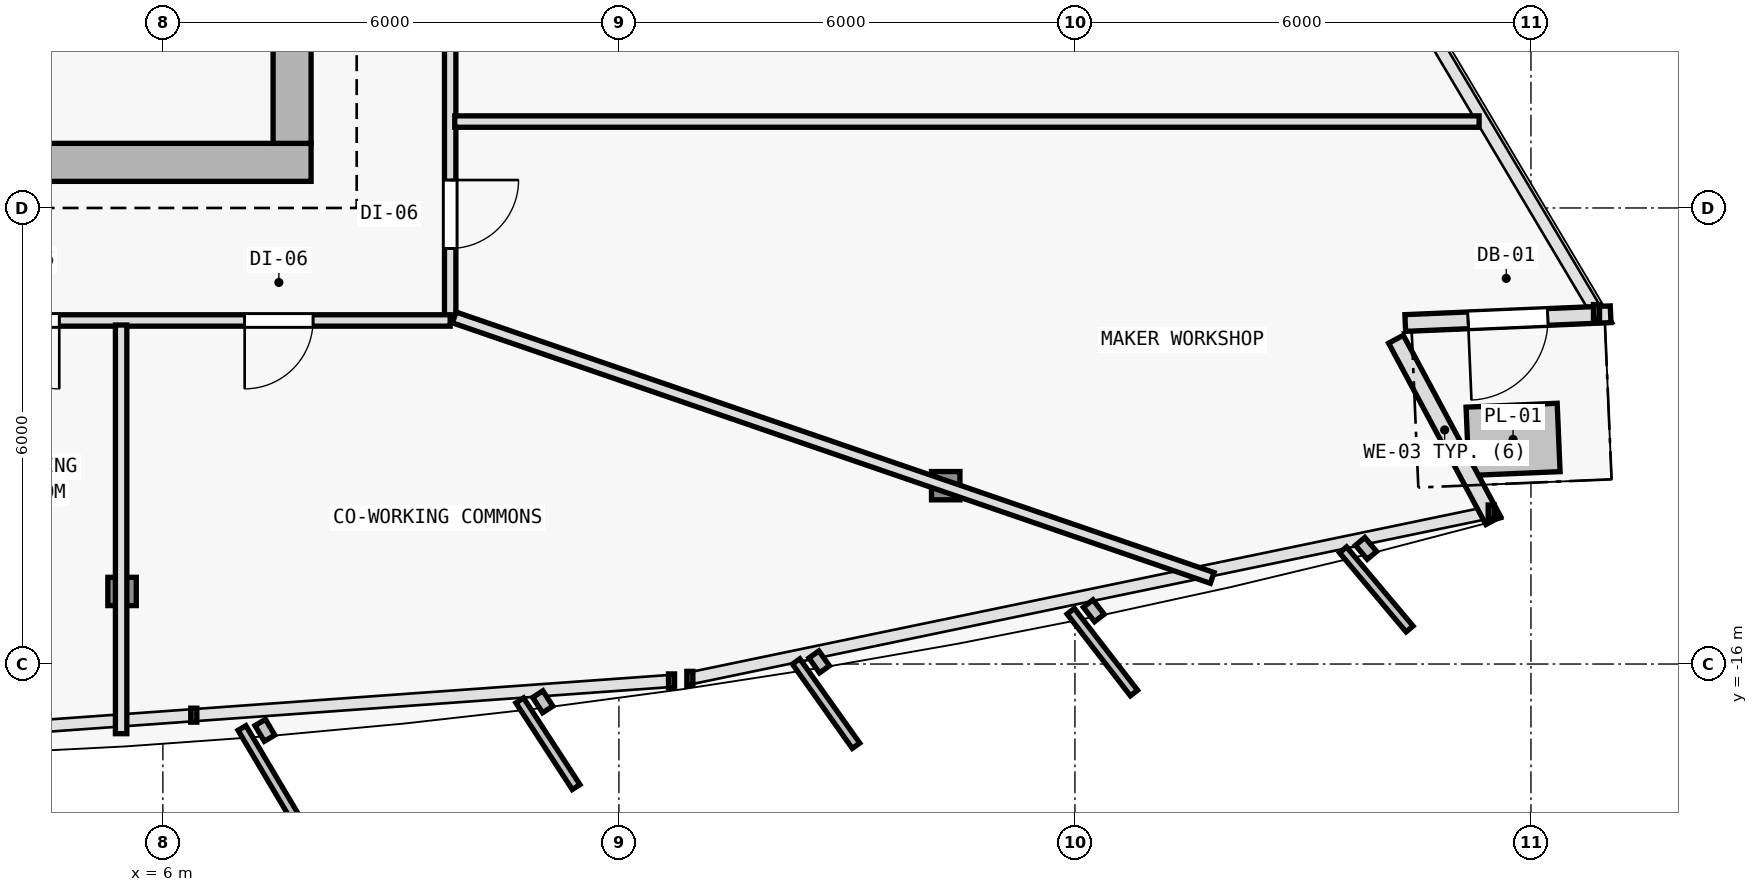
"""IFC4 building model, lengths in metres.
Left out: names, types, materials, properties, quantities, classifications, styles, units other than length and angle.
Written with IfcOpenShell. Run it as: python <this file> out.ifc"""

import sys

from ifc_helpers import new_model, si_unit, direction, frame, frame_2d, origin, origin_2d, place, context, subcontext, project, spatial, rectangle, i_section, extrude, element, fill, save


model = new_model("IFC4")
c1 = context("Model", 3, precision=1e-05, world=origin(), true_north=direction((0.0, 1.0)))
c2 = subcontext(c1, "Body", "Model", "MODEL_VIEW")
j1 = project(units=[si_unit("LENGTHUNIT", "METRE"), si_unit("PLANEANGLEUNIT", "RADIAN")], contexts=[c1])
p1 = place(None, origin())
s1 = spatial("IfcSite", under=j1, at=p1, CompositionType="ELEMENT")
p2 = place(p1, origin())
s2 = spatial("IfcBuilding", under=s1, at=p2, CompositionType="ELEMENT")
p3 = place(p2, frame((0.0, 0.0, 230.7)))
s3 = spatial("IfcBuildingStorey", under=s2, at=p3, CompositionType="ELEMENT", Elevation=230.7)
p4 = place(p3, frame((7.7, -9.4, 0.0), z_axis=(0.0, 0.0, 1.0), x_axis=(1.0, 0.0, 0.0)))
e1 = element("IfcColumn", 1, at=p4, inside=s3, PredefinedType="COLUMN", context=c2, shape_type="SweptSolid", body=[
    extrude(i_section(OverallWidth=0.398, OverallDepth=0.387, WebThickness=0.013, FlangeThickness=0.022, FilletRadius=0.015, at=origin_2d()), origin(), (0.0, 0.0, 1.0), 3.6),
])
p5 = place(p3, frame((5.463, -15.045, 0.006), z_axis=(-0.006934288159, 0.035283289748, 0.999353293441), x_axis=(-0.981229659911, -0.192842823335, 0.0)))
e2 = element("IfcColumn", 2, at=p5, inside=s3, PredefinedType="COLUMN", context=c2, shape_type="SweptSolid", body=[
    extrude(i_section(OverallWidth=0.374, OverallDepth=0.372, WebThickness=0.012, FlangeThickness=0.02, FilletRadius=0.015, at=origin_2d()), origin(), (0.0, 0.0, 1.0), 3.591),
])
p6 = place(p3, frame((16.3, -13.654, 0.006), z_axis=(-0.020596292833, 0.033511459955, 0.999226087917), x_axis=(-0.851954850327, -0.523615252838, 0.0)))
e3 = element("IfcColumn", 3, at=p6, inside=s3, PredefinedType="COLUMN", context=c2, shape_type="SweptSolid", body=[
    extrude(i_section(OverallWidth=0.374, OverallDepth=0.372, WebThickness=0.012, FlangeThickness=0.02, FilletRadius=0.015, at=origin_2d()), origin(), (0.0, 0.0, 1.0), 3.592),
])
p7 = place(p3, frame((22.224, -11.727, 0.0), z_axis=(0.0, 0.0, 1.0), x_axis=(0.47278184311, -0.881179509989, 0.0)))
e4 = element("IfcWall", 4, at=p7, inside=s3, PredefinedType="SOLIDWALL", context=c2, shape_type="SweptSolid", body=[
    extrude(rectangle(XDim=2.708, YDim=0.22, at=frame_2d((1.354, 0.0))), origin(), (0.0, 0.0, 1.0), 3.35),
])
p8 = place(p3, frame((25.048, -11.398, 0.0), z_axis=(0.0, 0.0, 1.0), x_axis=(-0.999095922254, -0.042512799655, 0.0)))
e5 = element("IfcWall", 5, at=p8, inside=s3, PredefinedType="SOLIDWALL", context=c2, shape_type="SweptSolid", body=[
    extrude(rectangle(XDim=2.705, YDim=0.22, at=frame_2d((1.353, 0.0))), origin(), (0.0, 0.0, 1.0), 3.35),
])
p9 = place(p8, frame((0.827, 0.0, 0.0)))
e6 = element("IfcOpeningElement", 6, at=p9, cuts=e5, PredefinedType="OPENING", context=c2, shape_type="SweptSolid", body=[
    extrude(rectangle(XDim=1.05, YDim=2.15, at=frame_2d((0.525, 1.075))), frame((0.0, 0.12, 0.0), z_axis=(0.0, -1.0, 0.0), x_axis=(1.0, 0.0, 0.0)), (0.0, 0.0, 1.0), 0.24),
])
p10 = place(p3, frame((-7.95, -9.4, 0.0), z_axis=(0.0, 0.0, 1.0), x_axis=(1.0, 0.0, 0.0)))
e7 = element("IfcWall", 7, at=p10, inside=s3, PredefinedType="SHEAR", context=c2, shape_type="SweptSolid", body=[
    extrude(rectangle(XDim=15.9, YDim=0.5, at=frame_2d((7.95, 0.0))), origin(), (0.0, 0.0, 1.0), 3.35),
])
p11 = place(p10, frame((9.6, 0.0, 0.0)))
e8 = element("IfcOpeningElement", 8, at=p11, cuts=e7, PredefinedType="OPENING", context=c2, shape_type="SweptSolid", body=[
    extrude(rectangle(XDim=1.5, YDim=2.2, at=frame_2d((0.75, 1.1))), frame((0.0, 0.26, 0.0), z_axis=(0.0, -1.0, 0.0), x_axis=(1.0, 0.0, 0.0)), (0.0, 0.0, 1.0), 0.52),
])
p12 = place(p3, frame((7.7, 9.95, 0.0), z_axis=(0.0, 0.0, 1.0), x_axis=(0.0, -1.0, 0.0)))
e9 = element("IfcWall", 9, at=p12, inside=s3, PredefinedType="SHEAR", context=c2, shape_type="SweptSolid", body=[
    extrude(rectangle(XDim=19.1, YDim=0.5, at=frame_2d((9.55, 0.0))), origin(), (0.0, 0.0, 1.0), 3.35),
])
p13 = place(p3, frame((9.78, 8.226, 0.0), z_axis=(0.0, 0.0, 1.0), x_axis=(0.0, -1.0, 0.0)))
e10 = element("IfcWall", 10, at=p13, inside=s3, PredefinedType="PARTITIONING", context=c2, shape_type="SweptSolid", body=[
    extrude(rectangle(XDim=19.706, YDim=0.15, at=frame_2d((9.853, 0.0))), origin(), (0.0, 0.0, 1.0), 2.875),
])
p14 = place(p13, frame((17.858, 0.0, 0.0)))
e11 = element("IfcOpeningElement", 11, at=p14, cuts=e10, PredefinedType="OPENING", context=c2, shape_type="SweptSolid", body=[
    extrude(rectangle(XDim=0.9, YDim=2.1, at=frame_2d((0.45, 1.05))), frame((0.0, 0.085, 0.0), z_axis=(0.0, -1.0, 0.0), x_axis=(1.0, 0.0, 0.0)), (0.0, 0.0, 1.0), 0.17),
])
p15 = place(p13, frame((14.97, 0.0, 0.0)))
e12 = element("IfcOpeningElement", 12, at=p15, cuts=e10, PredefinedType="OPENING", context=c2, shape_type="SweptSolid", body=[
    extrude(rectangle(XDim=0.9, YDim=2.1, at=frame_2d((0.45, 1.05))), frame((0.0, 0.085, 0.0), z_axis=(0.0, -1.0, 0.0), x_axis=(1.0, 0.0, 0.0)), (0.0, 0.0, 1.0), 0.17),
])
p16 = place(p13, frame((12.141, 0.0, 0.0)))
e13 = element("IfcOpeningElement", 13, at=p16, cuts=e10, PredefinedType="OPENING", context=c2, shape_type="SweptSolid", body=[
    extrude(rectangle(XDim=0.9, YDim=2.1, at=frame_2d((0.45, 1.05))), frame((0.0, 0.085, 0.0), z_axis=(0.0, -1.0, 0.0), x_axis=(1.0, 0.0, 0.0)), (0.0, 0.0, 1.0), 0.17),
])
p17 = place(p13, frame((9.909, 0.0, 0.0)))
e14 = element("IfcOpeningElement", 14, at=p17, cuts=e10, PredefinedType="OPENING", context=c2, shape_type="SweptSolid", body=[
    extrude(rectangle(XDim=0.9, YDim=2.1, at=frame_2d((0.45, 1.05))), frame((0.0, 0.085, 0.0), z_axis=(0.0, -1.0, 0.0), x_axis=(1.0, 0.0, 0.0)), (0.0, 0.0, 1.0), 0.17),
])
p18 = place(p13, frame((7.721, 0.0, 0.0)))
e15 = element("IfcOpeningElement", 15, at=p18, cuts=e10, PredefinedType="OPENING", context=c2, shape_type="SweptSolid", body=[
    extrude(rectangle(XDim=0.9, YDim=2.1, at=frame_2d((0.45, 1.05))), frame((0.0, 0.085, 0.0), z_axis=(0.0, -1.0, 0.0), x_axis=(1.0, 0.0, 0.0)), (0.0, 0.0, 1.0), 0.17),
])
p19 = place(p13, frame((5.136, 0.0, 0.0)))
e16 = element("IfcOpeningElement", 16, at=p19, cuts=e10, PredefinedType="OPENING", context=c2, shape_type="SweptSolid", body=[
    extrude(rectangle(XDim=0.9, YDim=2.1, at=frame_2d((0.45, 1.05))), frame((0.0, 0.085, 0.0), z_axis=(0.0, -1.0, 0.0), x_axis=(1.0, 0.0, 0.0)), (0.0, 0.0, 1.0), 0.17),
])
p20 = place(p13, frame((2.577, 0.0, 0.0)))
e17 = element("IfcOpeningElement", 17, at=p20, cuts=e10, PredefinedType="OPENING", context=c2, shape_type="SweptSolid", body=[
    extrude(rectangle(XDim=0.9, YDim=2.1, at=frame_2d((0.45, 1.05))), frame((0.0, 0.085, 0.0), z_axis=(0.0, -1.0, 0.0), x_axis=(1.0, 0.0, 0.0)), (0.0, 0.0, 1.0), 0.17),
])
p21 = place(p3, frame((9.78, -11.48, 0.0), z_axis=(0.0, 0.0, 1.0), x_axis=(-1.0, 0.0, 0.0)))
e18 = element("IfcWall", 18, at=p21, inside=s3, PredefinedType="PARTITIONING", context=c2, shape_type="SweptSolid", body=[
    extrude(rectangle(XDim=19.56, YDim=0.15, at=frame_2d((9.78, 0.0))), origin(), (0.0, 0.0, 1.0), 3.005),
])
p22 = place(p21, frame((13.737, 0.0, 0.0)))
e19 = element("IfcOpeningElement", 19, at=p22, cuts=e18, PredefinedType="OPENING", context=c2, shape_type="SweptSolid", body=[
    extrude(rectangle(XDim=0.9, YDim=2.1, at=frame_2d((0.45, 1.05))), frame((0.0, 0.085, 0.0), z_axis=(0.0, -1.0, 0.0), x_axis=(1.0, 0.0, 0.0)), (0.0, 0.0, 1.0), 0.17),
])
p23 = place(p21, frame((11.786, 0.0, 0.0)))
e20 = element("IfcOpeningElement", 20, at=p23, cuts=e18, PredefinedType="OPENING", context=c2, shape_type="SweptSolid", body=[
    extrude(rectangle(XDim=0.85, YDim=2.1, at=frame_2d((0.425, 1.05))), frame((0.0, 0.085, 0.0), z_axis=(0.0, -1.0, 0.0), x_axis=(1.0, 0.0, 0.0)), (0.0, 0.0, 1.0), 0.17),
])
p24 = place(p21, frame((9.711, 0.0, 0.0)))
e21 = element("IfcOpeningElement", 21, at=p24, cuts=e18, PredefinedType="OPENING", context=c2, shape_type="SweptSolid", body=[
    extrude(rectangle(XDim=0.9, YDim=2.1, at=frame_2d((0.45, 1.05))), frame((0.0, 0.085, 0.0), z_axis=(0.0, -1.0, 0.0), x_axis=(1.0, 0.0, 0.0)), (0.0, 0.0, 1.0), 0.17),
])
p25 = place(p21, frame((7.476, 0.0, 0.0)))
e22 = element("IfcOpeningElement", 22, at=p25, cuts=e18, PredefinedType="OPENING", context=c2, shape_type="SweptSolid", body=[
    extrude(rectangle(XDim=0.9, YDim=2.1, at=frame_2d((0.45, 1.05))), frame((0.0, 0.085, 0.0), z_axis=(0.0, -1.0, 0.0), x_axis=(1.0, 0.0, 0.0)), (0.0, 0.0, 1.0), 0.17),
])
p26 = place(p21, frame((5.143, 0.0, 0.0)))
e23 = element("IfcOpeningElement", 23, at=p26, cuts=e18, PredefinedType="OPENING", context=c2, shape_type="SweptSolid", body=[
    extrude(rectangle(XDim=0.9, YDim=2.1, at=frame_2d((0.45, 1.05))), frame((0.0, 0.085, 0.0), z_axis=(0.0, -1.0, 0.0), x_axis=(1.0, 0.0, 0.0)), (0.0, 0.0, 1.0), 0.17),
])
p27 = place(p21, frame((1.804, 0.0, 0.0)))
e24 = element("IfcOpeningElement", 24, at=p27, cuts=e18, PredefinedType="OPENING", context=c2, shape_type="SweptSolid", body=[
    extrude(rectangle(XDim=0.9, YDim=2.1, at=frame_2d((0.45, 1.05))), frame((0.0, 0.085, 0.0), z_axis=(0.0, -1.0, 0.0), x_axis=(1.0, 0.0, 0.0)), (0.0, 0.0, 1.0), 0.17),
])
p28 = place(p3, frame((5.45, -11.54, 0.0), z_axis=(0.0, 0.0, 1.0), x_axis=(0.0, -1.0, 0.0)))
e25 = element("IfcWall", 25, at=p28, inside=s3, PredefinedType="PARTITIONING", context=c2, shape_type="SweptSolid", body=[
    extrude(rectangle(XDim=5.376, YDim=0.15, at=frame_2d((2.688, 0.0))), origin(), (0.0, 0.0, 1.0), 2.775),
])
p29 = place(p3, frame((9.84, -8.863, 0.0), z_axis=(0.0, 0.0, 1.0), x_axis=(1.0, 0.0, 0.0)))
e26 = element("IfcWall", 26, at=p29, inside=s3, PredefinedType="PARTITIONING", context=c2, shape_type="SweptSolid", body=[
    extrude(rectangle(XDim=13.478, YDim=0.15, at=frame_2d((6.739, 0.0))), origin(), (0.0, 0.0, 1.0), 2.875),
])
p30 = place(p3, frame((9.834, -11.44, 0.0), z_axis=(0.0, 0.0, 1.0), x_axis=(0.945727964629, -0.324959408108, 0.0)))
e27 = element("IfcWall", 27, at=p30, inside=s3, PredefinedType="PARTITIONING", context=c2, shape_type="SweptSolid", body=[
    extrude(rectangle(XDim=10.544, YDim=0.15, at=frame_2d((5.272, 0.0))), origin(), (0.0, 0.0, 1.0), 2.825),
])
p31 = place(p9, origin())
e28 = element("IfcDoor", 28, at=p31, inside=s3, OperationType="SINGLE_SWING_RIGHT", PredefinedType="DOOR", context=c2, shape_type="SweptSolid", body=[
    extrude(rectangle(XDim=1.05, YDim=2.15, at=frame_2d((0.525, 1.075))), frame((0.0, 0.025, 0.0), z_axis=(0.0, -1.0, 0.0), x_axis=(1.0, 0.0, 0.0)), (0.0, 0.0, 1.0), 0.05),
])
fill(e6, e28)
p32 = place(p26, origin())
e29 = element("IfcDoor", 29, at=p32, inside=s3, OperationType="SINGLE_SWING_LEFT", PredefinedType="DOOR", context=c2, shape_type="SweptSolid", body=[
    extrude(rectangle(XDim=0.9, YDim=2.1, at=frame_2d((0.45, 1.05))), frame((0.0, 0.025, 0.0), z_axis=(0.0, -1.0, 0.0), x_axis=(1.0, 0.0, 0.0)), (0.0, 0.0, 1.0), 0.05),
])
fill(e23, e29)
p33 = place(p27, origin())
e30 = element("IfcDoor", 30, at=p33, inside=s3, OperationType="SINGLE_SWING_RIGHT", PredefinedType="DOOR", context=c2, shape_type="SweptSolid", body=[
    extrude(rectangle(XDim=0.9, YDim=2.1, at=frame_2d((0.45, 1.05))), frame((0.0, 0.025, 0.0), z_axis=(0.0, -1.0, 0.0), x_axis=(1.0, 0.0, 0.0)), (0.0, 0.0, 1.0), 0.05),
])
fill(e24, e30)
p34 = place(p14, origin())
e31 = element("IfcDoor", 31, at=p34, inside=s3, OperationType="SINGLE_SWING_LEFT", PredefinedType="DOOR", context=c2, shape_type="SweptSolid", body=[
    extrude(rectangle(XDim=0.9, YDim=2.1, at=frame_2d((0.45, 1.05))), frame((0.0, 0.025, 0.0), z_axis=(0.0, -1.0, 0.0), x_axis=(1.0, 0.0, 0.0)), (0.0, 0.0, 1.0), 0.05),
])
fill(e11, e31)
save(model, sys.argv[1])
